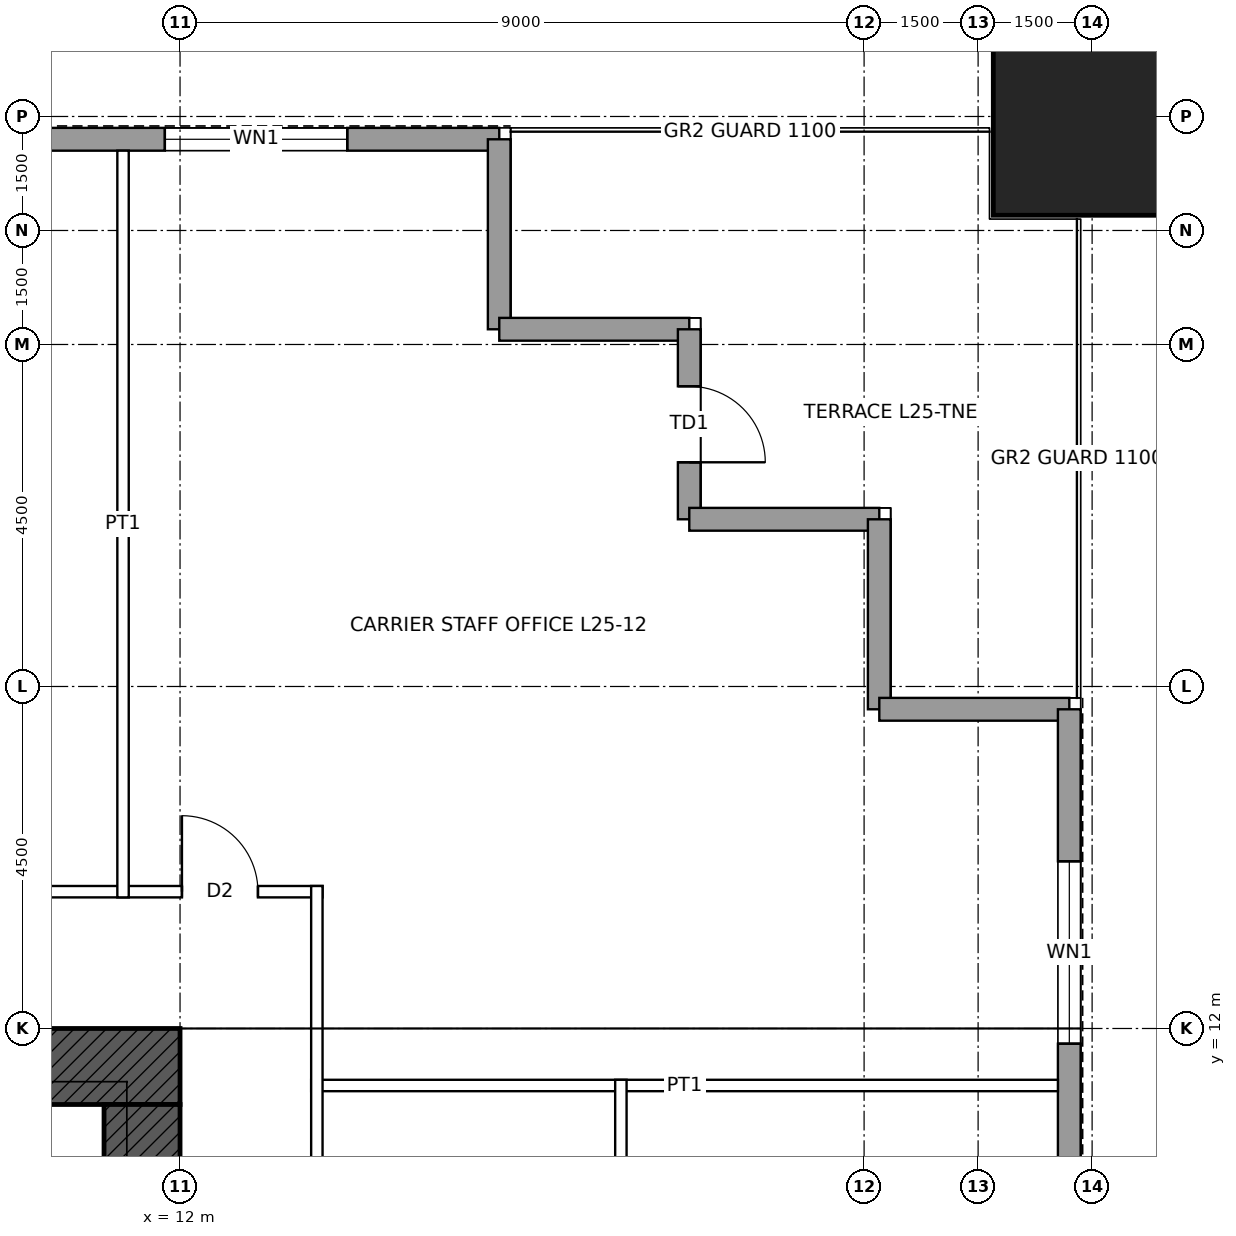
"""IFC4 building model, lengths in metres.
Left out: names, types, materials, properties, quantities, classifications, styles, units other than length and angle.
Written with IfcOpenShell. Run it as: python <this file> out.ifc"""

import sys

from ifc_helpers import new_model, si_unit, direction, frame, frame_2d, origin, origin_2d, place, context, subcontext, project, spatial, rectangle, hollow_rectangle, extrude, element, fill, save


model = new_model("IFC4")
c1 = context("Model", 3, precision=1e-05, world=origin(), true_north=direction((0.0, 1.0)))
c2 = subcontext(c1, "Body", "Model", "MODEL_VIEW")
j1 = project(units=[si_unit("LENGTHUNIT", "METRE"), si_unit("PLANEANGLEUNIT", "RADIAN")], contexts=[c1])
p1 = place(None, origin())
s1 = spatial("IfcSite", under=j1, at=p1, CompositionType="ELEMENT")
p2 = place(p1, origin())
s2 = spatial("IfcBuilding", under=s1, at=p2, CompositionType="ELEMENT")
p3 = place(p2, frame((0.0, 0.0, 126.9)))
s3 = spatial("IfcBuildingStorey", under=s2, at=p3, CompositionType="ELEMENT", Elevation=126.9)
p4 = place(p3, frame((24.0, 24.0, 0.0), z_axis=(0.0, 0.0, 1.0), x_axis=(1.0, 0.0, 0.0)))
e1 = element("IfcColumn", 1, at=p4, inside=s3, PredefinedType="COLUMN", context=c2, shape_type="SweptSolid", body=[
    extrude(hollow_rectangle(XDim=2.6, YDim=2.6, WallThickness=0.13, at=origin_2d()), origin(), (0.0, 0.0, 1.0), 4.5),
])
p5 = place(p3, frame((-12.0, 11.5, 0.0), z_axis=(0.0, 0.0, 1.0), x_axis=(1.0, 0.0, 0.0)))
e2 = element("IfcWall", 2, at=p5, inside=s3, PredefinedType="SHEAR", context=c2, shape_type="SweptSolid", body=[
    extrude(rectangle(XDim=24.0, YDim=1.0, at=frame_2d((12.0, 0.0))), origin(), (0.0, 0.0, 1.0), 4.5),
])
p6 = place(p5, frame((6.25, 0.0, 0.0)))
e3 = element("IfcOpeningElement", 3, at=p6, cuts=e2, PredefinedType="OPENING", context=c2, shape_type="SweptSolid", body=[
    extrude(rectangle(XDim=1.0, YDim=2.4, at=frame_2d((0.5, 1.2))), frame((0.0, 0.51, 0.0), z_axis=(0.0, -1.0, 0.0), x_axis=(1.0, 0.0, 0.0)), (0.0, 0.0, 1.0), 1.02),
])
p7 = place(p5, frame((16.75, 0.0, 0.0)))
e4 = element("IfcOpeningElement", 4, at=p7, cuts=e2, PredefinedType="OPENING", context=c2, shape_type="SweptSolid", body=[
    extrude(rectangle(XDim=1.0, YDim=2.4, at=frame_2d((0.5, 1.2))), frame((0.0, 0.51, 0.0), z_axis=(0.0, -1.0, 0.0), x_axis=(1.0, 0.0, 0.0)), (0.0, 0.0, 1.0), 1.02),
])
p8 = place(p3, frame((11.5, 11.0, 0.0), z_axis=(0.0, 0.0, 1.0), x_axis=(0.0, -1.0, 0.0)))
e5 = element("IfcWall", 5, at=p8, inside=s3, PredefinedType="SHEAR", context=c2, shape_type="SweptSolid", body=[
    extrude(rectangle(XDim=22.0, YDim=1.0, at=frame_2d((11.0, 0.0))), origin(), (0.0, 0.0, 1.0), 4.5),
])
p9 = place(p8, frame((10.5, 0.0, 0.0)))
e6 = element("IfcOpeningElement", 6, at=p9, cuts=e5, PredefinedType="OPENING", context=c2, shape_type="SweptSolid", body=[
    extrude(rectangle(XDim=1.0, YDim=2.4, at=frame_2d((0.5, 1.2))), frame((0.0, 0.51, 0.0), z_axis=(0.0, -1.0, 0.0), x_axis=(1.0, 0.0, 0.0)), (0.0, 0.0, 1.0), 1.02),
])
p10 = place(p3, frame((-16.2, 23.7, 0.0), z_axis=(0.0, 0.0, 1.0), x_axis=(1.0, 0.0, 0.0)))
e7 = element("IfcWall", 7, at=p10, inside=s3, PredefinedType="SOLIDWALL", context=c2, shape_type="SweptSolid", body=[
    extrude(rectangle(XDim=32.4, YDim=0.3, at=frame_2d((16.2, 0.0))), origin(), (0.0, 0.0, 1.0), 4.3),
])
p11 = place(p10, frame((2.0, 0.0, 1.0)))
e8 = element("IfcOpeningElement", 8, at=p11, cuts=e7, PredefinedType="OPENING", context=c2, shape_type="SweptSolid", body=[
    extrude(rectangle(XDim=2.4, YDim=1.2, at=frame_2d((1.2, 0.6))), frame((0.0, 0.16, 0.0), z_axis=(0.0, -1.0, 0.0), x_axis=(1.0, 0.0, 0.0)), (0.0, 0.0, 1.0), 0.32),
])
p12 = place(p10, frame((7.25, 0.0, 1.0)))
e9 = element("IfcOpeningElement", 9, at=p12, cuts=e7, PredefinedType="OPENING", context=c2, shape_type="SweptSolid", body=[
    extrude(rectangle(XDim=2.4, YDim=1.2, at=frame_2d((1.2, 0.6))), frame((0.0, 0.16, 0.0), z_axis=(0.0, -1.0, 0.0), x_axis=(1.0, 0.0, 0.0)), (0.0, 0.0, 1.0), 0.32),
])
p13 = place(p10, frame((9.95, 0.0, 1.0)))
e10 = element("IfcOpeningElement", 10, at=p13, cuts=e7, PredefinedType="OPENING", context=c2, shape_type="SweptSolid", body=[
    extrude(rectangle(XDim=2.4, YDim=1.2, at=frame_2d((1.2, 0.6))), frame((0.0, 0.16, 0.0), z_axis=(0.0, -1.0, 0.0), x_axis=(1.0, 0.0, 0.0)), (0.0, 0.0, 1.0), 0.32),
])
p14 = place(p10, frame((13.0, 0.0, 1.0)))
e11 = element("IfcOpeningElement", 11, at=p14, cuts=e7, PredefinedType="OPENING", context=c2, shape_type="SweptSolid", body=[
    extrude(rectangle(XDim=2.4, YDim=1.2, at=frame_2d((1.2, 0.6))), frame((0.0, 0.16, 0.0), z_axis=(0.0, -1.0, 0.0), x_axis=(1.0, 0.0, 0.0)), (0.0, 0.0, 1.0), 0.32),
])
p15 = place(p10, frame((17.0, 0.0, 1.0)))
e12 = element("IfcOpeningElement", 12, at=p15, cuts=e7, PredefinedType="OPENING", context=c2, shape_type="SweptSolid", body=[
    extrude(rectangle(XDim=2.4, YDim=1.2, at=frame_2d((1.2, 0.6))), frame((0.0, 0.16, 0.0), z_axis=(0.0, -1.0, 0.0), x_axis=(1.0, 0.0, 0.0)), (0.0, 0.0, 1.0), 0.32),
])
p16 = place(p10, frame((20.5, 0.0, 1.0)))
e13 = element("IfcOpeningElement", 13, at=p16, cuts=e7, PredefinedType="OPENING", context=c2, shape_type="SweptSolid", body=[
    extrude(rectangle(XDim=2.4, YDim=1.2, at=frame_2d((1.2, 0.6))), frame((0.0, 0.16, 0.0), z_axis=(0.0, -1.0, 0.0), x_axis=(1.0, 0.0, 0.0)), (0.0, 0.0, 1.0), 0.32),
])
p17 = place(p10, frame((23.35, 0.0, 1.0)))
e14 = element("IfcOpeningElement", 14, at=p17, cuts=e7, PredefinedType="OPENING", context=c2, shape_type="SweptSolid", body=[
    extrude(rectangle(XDim=1.8, YDim=1.2, at=frame_2d((0.9, 0.6))), frame((0.0, 0.16, 0.0), z_axis=(0.0, -1.0, 0.0), x_axis=(1.0, 0.0, 0.0)), (0.0, 0.0, 1.0), 0.32),
])
p18 = place(p10, frame((28.0, 0.0, 1.0)))
e15 = element("IfcOpeningElement", 15, at=p18, cuts=e7, PredefinedType="OPENING", context=c2, shape_type="SweptSolid", body=[
    extrude(rectangle(XDim=2.4, YDim=1.2, at=frame_2d((1.2, 0.6))), frame((0.0, 0.16, 0.0), z_axis=(0.0, -1.0, 0.0), x_axis=(1.0, 0.0, 0.0)), (0.0, 0.0, 1.0), 0.32),
])
for number, where, z_axis, x_axis in (
    (16, (16.2, 23.7, 0.0), (0.0, 0.0, 1.0), (0.0, -1.0, 0.0)),
    (17, (16.2, 21.2, 0.0), (0.0, 0.0, 1.0), (1.0, 0.0, 0.0)),
):
    element("IfcWall", number, at=place(p3, frame(where, z_axis=z_axis, x_axis=x_axis)), inside=s3, PredefinedType="SOLIDWALL", context=c2, shape_type="SweptSolid", body=[
        extrude(rectangle(XDim=2.5, YDim=0.3, at=frame_2d((1.25, 0.0))), origin(), (0.0, 0.0, 1.0), 4.3),
    ])
p19 = place(p3, frame((18.7, 21.2, 0.0), z_axis=(0.0, 0.0, 1.0), x_axis=(0.0, -1.0, 0.0)))
e18 = element("IfcWall", 18, at=p19, inside=s3, PredefinedType="SOLIDWALL", context=c2, shape_type="SweptSolid", body=[
    extrude(rectangle(XDim=2.5, YDim=0.3, at=frame_2d((1.25, 0.0))), origin(), (0.0, 0.0, 1.0), 4.3),
])
p20 = place(p19, frame((0.75, 0.0, 0.0)))
e19 = element("IfcOpeningElement", 19, at=p20, cuts=e18, PredefinedType="OPENING", context=c2, shape_type="SweptSolid", body=[
    extrude(rectangle(XDim=1.0, YDim=2.4, at=frame_2d((0.5, 1.2))), frame((0.0, 0.16, 0.0), z_axis=(0.0, -1.0, 0.0), x_axis=(1.0, 0.0, 0.0)), (0.0, 0.0, 1.0), 0.32),
])
for number, where, z_axis, x_axis in (
    (20, (18.7, 18.7, 0.0), (0.0, 0.0, 1.0), (1.0, 0.0, 0.0)),
    (21, (21.2, 18.7, 0.0), (0.0, 0.0, 1.0), (0.0, -1.0, 0.0)),
    (22, (21.2, 16.2, 0.0), (0.0, 0.0, 1.0), (1.0, 0.0, 0.0)),
):
    element("IfcWall", number, at=place(p3, frame(where, z_axis=z_axis, x_axis=x_axis)), inside=s3, PredefinedType="SOLIDWALL", context=c2, shape_type="SweptSolid", body=[
        extrude(rectangle(XDim=2.5, YDim=0.3, at=frame_2d((1.25, 0.0))), origin(), (0.0, 0.0, 1.0), 4.3),
    ])
p21 = place(p3, frame((23.7, 16.2, 0.0), z_axis=(0.0, 0.0, 1.0), x_axis=(0.0, -1.0, 0.0)))
e23 = element("IfcWall", 23, at=p21, inside=s3, PredefinedType="SOLIDWALL", context=c2, shape_type="SweptSolid", body=[
    extrude(rectangle(XDim=32.4, YDim=0.3, at=frame_2d((16.2, 0.0))), origin(), (0.0, 0.0, 1.0), 4.3),
])
p22 = place(p21, frame((2.0, 0.0, 1.0)))
e24 = element("IfcOpeningElement", 24, at=p22, cuts=e23, PredefinedType="OPENING", context=c2, shape_type="SweptSolid", body=[
    extrude(rectangle(XDim=2.4, YDim=1.2, at=frame_2d((1.2, 0.6))), frame((0.0, 0.16, 0.0), z_axis=(0.0, -1.0, 0.0), x_axis=(1.0, 0.0, 0.0)), (0.0, 0.0, 1.0), 0.32),
])
p23 = place(p21, frame((7.25, 0.0, 1.0)))
e25 = element("IfcOpeningElement", 25, at=p23, cuts=e23, PredefinedType="OPENING", context=c2, shape_type="SweptSolid", body=[
    extrude(rectangle(XDim=2.4, YDim=1.2, at=frame_2d((1.2, 0.6))), frame((0.0, 0.16, 0.0), z_axis=(0.0, -1.0, 0.0), x_axis=(1.0, 0.0, 0.0)), (0.0, 0.0, 1.0), 0.32),
])
p24 = place(p21, frame((9.95, 0.0, 1.0)))
e26 = element("IfcOpeningElement", 26, at=p24, cuts=e23, PredefinedType="OPENING", context=c2, shape_type="SweptSolid", body=[
    extrude(rectangle(XDim=2.4, YDim=1.2, at=frame_2d((1.2, 0.6))), frame((0.0, 0.16, 0.0), z_axis=(0.0, -1.0, 0.0), x_axis=(1.0, 0.0, 0.0)), (0.0, 0.0, 1.0), 0.32),
])
p25 = place(p21, frame((13.0, 0.0, 1.0)))
e27 = element("IfcOpeningElement", 27, at=p25, cuts=e23, PredefinedType="OPENING", context=c2, shape_type="SweptSolid", body=[
    extrude(rectangle(XDim=2.4, YDim=1.2, at=frame_2d((1.2, 0.6))), frame((0.0, 0.16, 0.0), z_axis=(0.0, -1.0, 0.0), x_axis=(1.0, 0.0, 0.0)), (0.0, 0.0, 1.0), 0.32),
])
p26 = place(p21, frame((17.0, 0.0, 1.0)))
e28 = element("IfcOpeningElement", 28, at=p26, cuts=e23, PredefinedType="OPENING", context=c2, shape_type="SweptSolid", body=[
    extrude(rectangle(XDim=2.4, YDim=1.2, at=frame_2d((1.2, 0.6))), frame((0.0, 0.16, 0.0), z_axis=(0.0, -1.0, 0.0), x_axis=(1.0, 0.0, 0.0)), (0.0, 0.0, 1.0), 0.32),
])
p27 = place(p21, frame((20.05, 0.0, 1.0)))
e29 = element("IfcOpeningElement", 29, at=p27, cuts=e23, PredefinedType="OPENING", context=c2, shape_type="SweptSolid", body=[
    extrude(rectangle(XDim=2.4, YDim=1.2, at=frame_2d((1.2, 0.6))), frame((0.0, 0.16, 0.0), z_axis=(0.0, -1.0, 0.0), x_axis=(1.0, 0.0, 0.0)), (0.0, 0.0, 1.0), 0.32),
])
p28 = place(p21, frame((22.75, 0.0, 1.0)))
e30 = element("IfcOpeningElement", 30, at=p28, cuts=e23, PredefinedType="OPENING", context=c2, shape_type="SweptSolid", body=[
    extrude(rectangle(XDim=2.4, YDim=1.2, at=frame_2d((1.2, 0.6))), frame((0.0, 0.16, 0.0), z_axis=(0.0, -1.0, 0.0), x_axis=(1.0, 0.0, 0.0)), (0.0, 0.0, 1.0), 0.32),
])
p29 = place(p21, frame((28.0, 0.0, 1.0)))
e31 = element("IfcOpeningElement", 31, at=p29, cuts=e23, PredefinedType="OPENING", context=c2, shape_type="SweptSolid", body=[
    extrude(rectangle(XDim=2.4, YDim=1.2, at=frame_2d((1.2, 0.6))), frame((0.0, 0.16, 0.0), z_axis=(0.0, -1.0, 0.0), x_axis=(1.0, 0.0, 0.0)), (0.0, 0.0, 1.0), 0.32),
])
p30 = place(p3, frame((13.725, 11.25, 0.0), z_axis=(0.0, 0.0, 1.0), x_axis=(1.0, 0.0, 0.0)))
e32 = element("IfcWall", 32, at=p30, inside=s3, PredefinedType="PARTITIONING", context=c2, shape_type="SweptSolid", body=[
    extrude(rectangle(XDim=9.825, YDim=0.15, at=frame_2d((4.913, 0.0))), origin(), (0.0, 0.0, 1.0), 3.431),
])
p31 = place(p3, frame((-13.875, 13.8, 0.0), z_axis=(0.0, 0.0, 1.0), x_axis=(1.0, 0.0, 0.0)))
e33 = element("IfcWall", 33, at=p31, inside=s3, PredefinedType="PARTITIONING", context=c2, shape_type="SweptSolid", body=[
    extrude(rectangle(XDim=27.75, YDim=0.15, at=frame_2d((13.875, 0.0))), origin(), (0.0, 0.0, 1.0), 4.3),
])
p32 = place(p31, frame((5.475, 0.0, 0.0)))
e34 = element("IfcOpeningElement", 34, at=p32, cuts=e33, PredefinedType="OPENING", context=c2, shape_type="SweptSolid", body=[
    extrude(rectangle(XDim=1.8, YDim=2.4, at=frame_2d((0.9, 1.2))), frame((0.0, 0.085, 0.0), z_axis=(0.0, -1.0, 0.0), x_axis=(1.0, 0.0, 0.0)), (0.0, 0.0, 1.0), 0.17),
])
p33 = place(p31, frame((13.375, 0.0, 0.0)))
e35 = element("IfcOpeningElement", 35, at=p33, cuts=e33, PredefinedType="OPENING", context=c2, shape_type="SweptSolid", body=[
    extrude(rectangle(XDim=1.0, YDim=2.1, at=frame_2d((0.5, 1.05))), frame((0.0, 0.085, 0.0), z_axis=(0.0, -1.0, 0.0), x_axis=(1.0, 0.0, 0.0)), (0.0, 0.0, 1.0), 0.17),
])
p34 = place(p31, frame((20.475, 0.0, 0.0)))
e36 = element("IfcOpeningElement", 36, at=p34, cuts=e33, PredefinedType="OPENING", context=c2, shape_type="SweptSolid", body=[
    extrude(rectangle(XDim=1.8, YDim=2.4, at=frame_2d((0.9, 1.2))), frame((0.0, 0.085, 0.0), z_axis=(0.0, -1.0, 0.0), x_axis=(1.0, 0.0, 0.0)), (0.0, 0.0, 1.0), 0.17),
])
p35 = place(p31, frame((25.9, 0.0, 0.0)))
e37 = element("IfcOpeningElement", 37, at=p35, cuts=e33, PredefinedType="OPENING", context=c2, shape_type="SweptSolid", body=[
    extrude(rectangle(XDim=1.0, YDim=2.1, at=frame_2d((0.5, 1.05))), frame((0.0, 0.085, 0.0), z_axis=(0.0, -1.0, 0.0), x_axis=(1.0, 0.0, 0.0)), (0.0, 0.0, 1.0), 0.17),
])
p36 = place(p31, frame((0.85, 0.0, 0.0)))
e38 = element("IfcOpeningElement", 38, at=p36, cuts=e33, PredefinedType="OPENING", context=c2, shape_type="SweptSolid", body=[
    extrude(rectangle(XDim=1.0, YDim=2.1, at=frame_2d((0.5, 1.05))), frame((0.0, 0.085, 0.0), z_axis=(0.0, -1.0, 0.0), x_axis=(1.0, 0.0, 0.0)), (0.0, 0.0, 1.0), 0.17),
])
p37 = place(p3, frame((11.25, 13.725, 0.0), z_axis=(0.0, 0.0, 1.0), x_axis=(0.0, 1.0, 0.0)))
e39 = element("IfcWall", 39, at=p37, inside=s3, PredefinedType="PARTITIONING", context=c2, shape_type="SweptSolid", body=[
    extrude(rectangle(XDim=9.825, YDim=0.15, at=frame_2d((4.913, 0.0))), origin(), (0.0, 0.0, 1.0), 3.431),
])
p38 = place(p3, frame((13.8, -13.875, 0.0), z_axis=(0.0, 0.0, 1.0), x_axis=(0.0, 1.0, 0.0)))
e40 = element("IfcWall", 40, at=p38, inside=s3, PredefinedType="PARTITIONING", context=c2, shape_type="SweptSolid", body=[
    extrude(rectangle(XDim=27.75, YDim=0.15, at=frame_2d((13.875, 0.0))), origin(), (0.0, 0.0, 1.0), 4.3),
])
p39 = place(p38, frame((20.875, 0.0, 0.0)))
e41 = element("IfcOpeningElement", 41, at=p39, cuts=e40, PredefinedType="OPENING", context=c2, shape_type="SweptSolid", body=[
    extrude(rectangle(XDim=1.0, YDim=2.1, at=frame_2d((0.5, 1.05))), frame((0.0, 0.085, 0.0), z_axis=(0.0, -1.0, 0.0), x_axis=(1.0, 0.0, 0.0)), (0.0, 0.0, 1.0), 0.17),
])
p40 = place(p38, frame((9.225, 0.0, 0.0)))
e42 = element("IfcOpeningElement", 42, at=p40, cuts=e40, PredefinedType="OPENING", context=c2, shape_type="SweptSolid", body=[
    extrude(rectangle(XDim=1.8, YDim=2.4, at=frame_2d((0.9, 1.2))), frame((0.0, 0.085, 0.0), z_axis=(0.0, -1.0, 0.0), x_axis=(1.0, 0.0, 0.0)), (0.0, 0.0, 1.0), 0.17),
])
p41 = place(p3, frame((17.8, 3.675, 0.0), z_axis=(0.0, 0.0, 1.0), x_axis=(0.0, 1.0, 0.0)))
e43 = element("IfcWall", 43, at=p41, inside=s3, PredefinedType="PARTITIONING", context=c2, shape_type="SweptSolid", body=[
    extrude(rectangle(XDim=7.65, YDim=0.15, at=frame_2d((3.825, 0.0))), origin(), (0.0, 0.0, 1.0), 4.3),
])
p42 = place(p18, origin())
e44 = element("IfcWindow", 44, at=p42, inside=s3, PartitioningType="SINGLE_PANEL", PredefinedType="WINDOW", context=c2, shape_type="SweptSolid", body=[
    extrude(rectangle(XDim=2.4, YDim=1.2, at=frame_2d((1.2, 0.6))), frame((0.0, 0.03, 0.0), z_axis=(0.0, -1.0, 0.0), x_axis=(1.0, 0.0, 0.0)), (0.0, 0.0, 1.0), 0.06),
])
fill(e15, e44)
p43 = place(p20, origin())
e45 = element("IfcDoor", 45, at=p43, inside=s3, OperationType="SINGLE_SWING_RIGHT", PredefinedType="DOOR", context=c2, shape_type="SweptSolid", body=[
    extrude(rectangle(XDim=1.0, YDim=2.4, at=frame_2d((0.5, 1.2))), frame((0.0, 0.025, 0.0), z_axis=(0.0, -1.0, 0.0), x_axis=(1.0, 0.0, 0.0)), (0.0, 0.0, 1.0), 0.05),
])
fill(e19, e45)
p44 = place(p22, origin())
e46 = element("IfcWindow", 46, at=p44, inside=s3, PartitioningType="SINGLE_PANEL", PredefinedType="WINDOW", context=c2, shape_type="SweptSolid", body=[
    extrude(rectangle(XDim=2.4, YDim=1.2, at=frame_2d((1.2, 0.6))), frame((0.0, 0.03, 0.0), z_axis=(0.0, -1.0, 0.0), x_axis=(1.0, 0.0, 0.0)), (0.0, 0.0, 1.0), 0.06),
])
fill(e24, e46)
p45 = place(p35, origin())
e47 = element("IfcDoor", 47, at=p45, inside=s3, OperationType="SINGLE_SWING_LEFT", PredefinedType="DOOR", context=c2, shape_type="SweptSolid", body=[
    extrude(rectangle(XDim=1.0, YDim=2.1, at=frame_2d((0.5, 1.05))), frame((0.0, 0.025, 0.0), z_axis=(0.0, -1.0, 0.0), x_axis=(1.0, 0.0, 0.0)), (0.0, 0.0, 1.0), 0.05),
])
fill(e37, e47)
save(model, sys.argv[1])
